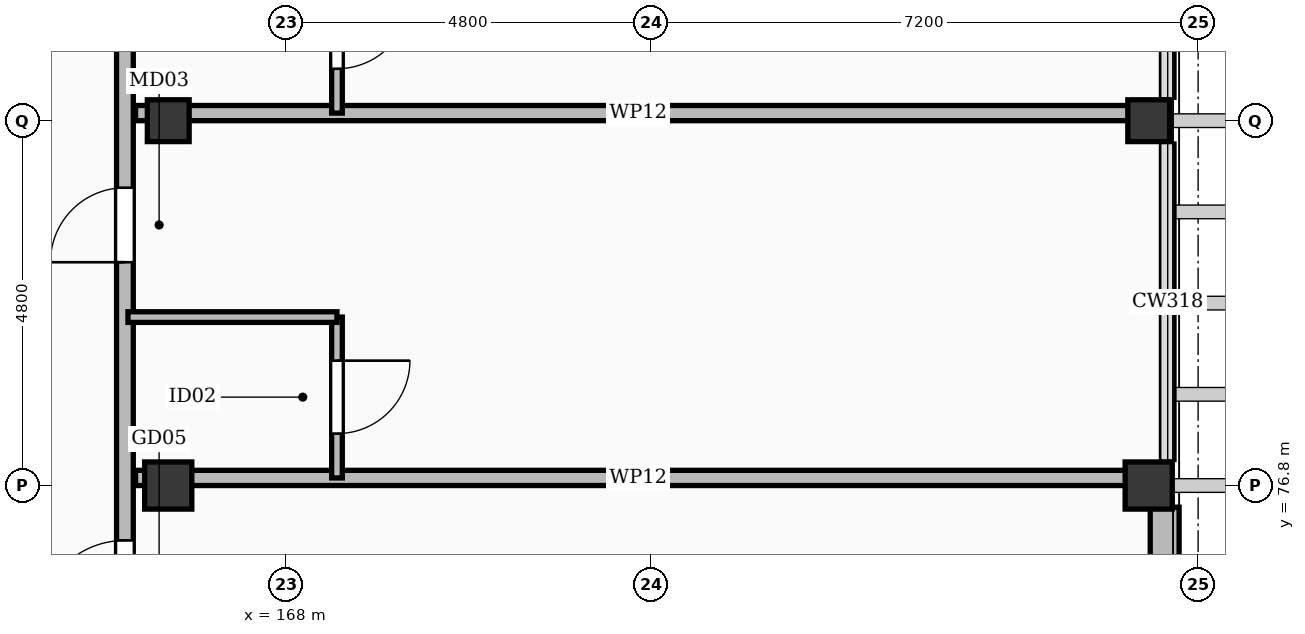
"""IFC4 building model, lengths in metres.
Left out: names, types, materials, properties, quantities, classifications, styles, units other than length and angle.
Written with IfcOpenShell. Run it as: python <this file> out.ifc"""

import sys

from ifc_helpers import new_model, si_unit, direction, frame, frame_2d, origin, origin_2d, place, context, subcontext, project, spatial, rectangle, extrude, element, fill, save


model = new_model("IFC4")
c1 = context("Model", 3, precision=1e-05, world=origin(), true_north=direction((0.0, 1.0)))
c2 = subcontext(c1, "Body", "Model", "MODEL_VIEW")
j1 = project(units=[si_unit("LENGTHUNIT", "METRE"), si_unit("PLANEANGLEUNIT", "RADIAN")], contexts=[c1])
p1 = place(None, origin())
s1 = spatial("IfcSite", under=j1, at=p1, CompositionType="ELEMENT")
p2 = place(p1, origin())
s2 = spatial("IfcBuilding", under=s1, at=p2, CompositionType="ELEMENT")
p3 = place(p2, frame((0.0, 0.0, 42.6)))
s3 = spatial("IfcBuildingStorey", under=s2, at=p3, CompositionType="ELEMENT", Elevation=42.6)
for number, where, z_axis, x_axis in (
    (1, (166.45, 76.8, 0.0), (0.0, 0.0, 1.0), (1.0, 0.0, 0.0)),
    (2, (179.35, 76.8, 0.0), (0.0, 0.0, 1.0), (1.0, 0.0, 0.0)),
):
    element("IfcColumn", number, at=place(p3, frame(where, z_axis=z_axis, x_axis=x_axis)), inside=s3, PredefinedType="COLUMN", context=c2, shape_type="SweptSolid", body=[
        extrude(rectangle(XDim=0.62, YDim=0.62, at=origin_2d()), origin(), (0.0, 0.0, 1.0), 3.9),
    ])
for number, where, z_axis, x_axis in (
    (3, (166.45, 81.6, 0.0), (0.0, 0.0, 1.0), (1.0, 0.0, 0.0)),
    (4, (179.35, 81.6, 0.0), (0.0, 0.0, 1.0), (1.0, 0.0, 0.0)),
):
    element("IfcColumn", number, at=place(p3, frame(where, z_axis=z_axis, x_axis=x_axis)), inside=s3, PredefinedType="COLUMN", context=c2, shape_type="SweptSolid", body=[
        extrude(rectangle(XDim=0.55, YDim=0.55, at=origin_2d()), origin(), (0.0, 0.0, 1.0), 3.9),
    ])
p4 = place(p3, frame((179.56, 76.515, 0.0), z_axis=(0.0, 0.0, 1.0), x_axis=(0.0, -1.0, 0.0)))
e5 = element("IfcWall", 5, at=p4, inside=s3, PredefinedType="SOLIDWALL", context=c2, shape_type="SweptSolid", body=[
    extrude(rectangle(XDim=4.265, YDim=0.38, at=frame_2d((2.132, 0.0))), origin(), (0.0, 0.0, 1.0), 2.902),
])
p5 = place(p4, frame((0.933, 0.0, 0.55)))
e6 = element("IfcOpeningElement", 6, at=p5, cuts=e5, PredefinedType="OPENING", context=c2, shape_type="SweptSolid", body=[
    extrude(rectangle(XDim=2.4, YDim=1.8, at=frame_2d((1.2, 0.9))), frame((0.0, 0.202, 0.0), z_axis=(0.0, -1.0, 0.0), x_axis=(1.0, 0.0, 0.0)), (0.0, 0.0, 1.0), 0.404),
])
p6 = place(p3, frame((165.88, 62.75, 0.0), z_axis=(0.0, 0.0, 1.0), x_axis=(0.0, 1.0, 0.0)))
e7 = element("IfcWall", 7, at=p6, inside=s3, PredefinedType="PARTITIONING", context=c2, shape_type="SweptSolid", body=[
    extrude(rectangle(XDim=62.9, YDim=0.22, at=frame_2d((31.45, 0.0))), origin(), (0.0, 0.0, 1.0), 2.902),
])
p7 = place(p6, frame((0.691, 0.0, 0.0)))
e8 = element("IfcOpeningElement", 8, at=p7, cuts=e7, PredefinedType="OPENING", context=c2, shape_type="SweptSolid", body=[
    extrude(rectangle(XDim=1.05, YDim=2.22, at=frame_2d((0.525, 1.11))), frame((0.0, 0.122, 0.0), z_axis=(0.0, -1.0, 0.0), x_axis=(1.0, 0.0, 0.0)), (0.0, 0.0, 1.0), 0.244),
])
p8 = place(p6, frame((7.388, 0.0, 0.0)))
e9 = element("IfcOpeningElement", 9, at=p8, cuts=e7, PredefinedType="OPENING", context=c2, shape_type="SweptSolid", body=[
    extrude(rectangle(XDim=1.02, YDim=2.2, at=frame_2d((0.51, 1.1))), frame((0.0, 0.122, 0.0), z_axis=(0.0, -1.0, 0.0), x_axis=(1.0, 0.0, 0.0)), (0.0, 0.0, 1.0), 0.244),
])
p9 = place(p6, frame((12.188, 0.0, 0.0)))
e10 = element("IfcOpeningElement", 10, at=p9, cuts=e7, PredefinedType="OPENING", context=c2, shape_type="SweptSolid", body=[
    extrude(rectangle(XDim=1.14, YDim=2.26, at=frame_2d((0.57, 1.13))), frame((0.0, 0.122, 0.0), z_axis=(0.0, -1.0, 0.0), x_axis=(1.0, 0.0, 0.0)), (0.0, 0.0, 1.0), 0.244),
])
p10 = place(p6, frame((16.988, 0.0, 0.0)))
e11 = element("IfcOpeningElement", 11, at=p10, cuts=e7, PredefinedType="OPENING", context=c2, shape_type="SweptSolid", body=[
    extrude(rectangle(XDim=0.98, YDim=2.15, at=frame_2d((0.49, 1.075))), frame((0.0, 0.122, 0.0), z_axis=(0.0, -1.0, 0.0), x_axis=(1.0, 0.0, 0.0)), (0.0, 0.0, 1.0), 0.244),
])
p11 = place(p6, frame((21.788, 0.0, 0.0)))
e12 = element("IfcOpeningElement", 12, at=p11, cuts=e7, PredefinedType="OPENING", context=c2, shape_type="SweptSolid", body=[
    extrude(rectangle(XDim=1.28, YDim=2.16, at=frame_2d((0.64, 1.08))), frame((0.0, 0.122, 0.0), z_axis=(0.0, -1.0, 0.0), x_axis=(1.0, 0.0, 0.0)), (0.0, 0.0, 1.0), 0.244),
])
p12 = place(p6, frame((26.588, 0.0, 0.0)))
e13 = element("IfcOpeningElement", 13, at=p12, cuts=e7, PredefinedType="OPENING", context=c2, shape_type="SweptSolid", body=[
    extrude(rectangle(XDim=0.9, YDim=2.08, at=frame_2d((0.45, 1.04))), frame((0.0, 0.122, 0.0), z_axis=(0.0, -1.0, 0.0), x_axis=(1.0, 0.0, 0.0)), (0.0, 0.0, 1.0), 0.244),
])
p13 = place(p6, frame((31.388, 0.0, 0.0)))
e14 = element("IfcOpeningElement", 14, at=p13, cuts=e7, PredefinedType="OPENING", context=c2, shape_type="SweptSolid", body=[
    extrude(rectangle(XDim=1.05, YDim=2.22, at=frame_2d((0.525, 1.11))), frame((0.0, 0.122, 0.0), z_axis=(0.0, -1.0, 0.0), x_axis=(1.0, 0.0, 0.0)), (0.0, 0.0, 1.0), 0.244),
])
p14 = place(p6, frame((36.188, 0.0, 0.0)))
e15 = element("IfcOpeningElement", 15, at=p14, cuts=e7, PredefinedType="OPENING", context=c2, shape_type="SweptSolid", body=[
    extrude(rectangle(XDim=1.02, YDim=2.2, at=frame_2d((0.51, 1.1))), frame((0.0, 0.122, 0.0), z_axis=(0.0, -1.0, 0.0), x_axis=(1.0, 0.0, 0.0)), (0.0, 0.0, 1.0), 0.244),
])
p15 = place(p6, frame((40.988, 0.0, 0.0)))
e16 = element("IfcOpeningElement", 16, at=p15, cuts=e7, PredefinedType="OPENING", context=c2, shape_type="SweptSolid", body=[
    extrude(rectangle(XDim=1.14, YDim=2.26, at=frame_2d((0.57, 1.13))), frame((0.0, 0.122, 0.0), z_axis=(0.0, -1.0, 0.0), x_axis=(1.0, 0.0, 0.0)), (0.0, 0.0, 1.0), 0.244),
])
p16 = place(p6, frame((45.788, 0.0, 0.0)))
e17 = element("IfcOpeningElement", 17, at=p16, cuts=e7, PredefinedType="OPENING", context=c2, shape_type="SweptSolid", body=[
    extrude(rectangle(XDim=0.98, YDim=2.15, at=frame_2d((0.49, 1.075))), frame((0.0, 0.122, 0.0), z_axis=(0.0, -1.0, 0.0), x_axis=(1.0, 0.0, 0.0)), (0.0, 0.0, 1.0), 0.244),
])
p17 = place(p6, frame((50.588, 0.0, 0.0)))
e18 = element("IfcOpeningElement", 18, at=p17, cuts=e7, PredefinedType="OPENING", context=c2, shape_type="SweptSolid", body=[
    extrude(rectangle(XDim=1.28, YDim=2.16, at=frame_2d((0.64, 1.08))), frame((0.0, 0.122, 0.0), z_axis=(0.0, -1.0, 0.0), x_axis=(1.0, 0.0, 0.0)), (0.0, 0.0, 1.0), 0.244),
])
p18 = place(p6, frame((55.388, 0.0, 0.0)))
e19 = element("IfcOpeningElement", 19, at=p18, cuts=e7, PredefinedType="OPENING", context=c2, shape_type="SweptSolid", body=[
    extrude(rectangle(XDim=0.9, YDim=2.08, at=frame_2d((0.45, 1.04))), frame((0.0, 0.122, 0.0), z_axis=(0.0, -1.0, 0.0), x_axis=(1.0, 0.0, 0.0)), (0.0, 0.0, 1.0), 0.244),
])
p19 = place(p6, frame((60.188, 0.0, 0.0)))
e20 = element("IfcOpeningElement", 20, at=p19, cuts=e7, PredefinedType="OPENING", context=c2, shape_type="SweptSolid", body=[
    extrude(rectangle(XDim=1.05, YDim=2.22, at=frame_2d((0.525, 1.11))), frame((0.0, 0.122, 0.0), z_axis=(0.0, -1.0, 0.0), x_axis=(1.0, 0.0, 0.0)), (0.0, 0.0, 1.0), 0.244),
])
p20 = place(p3, frame((166.02, 76.9, 0.0), z_axis=(0.0, 0.0, 1.0), x_axis=(1.0, 0.0, 0.0)))
e21 = element("IfcWall", 21, at=p20, inside=s3, PredefinedType="PARTITIONING", context=c2, shape_type="SweptSolid", body=[
    extrude(rectangle(XDim=13.23, YDim=0.2, at=frame_2d((6.615, 0.0))), origin(), (0.0, 0.0, 1.0), 2.902),
])
p21 = place(p3, frame((168.67, 76.9, 0.0), z_axis=(0.0, 0.0, 1.0), x_axis=(0.0, 1.0, 0.0)))
e22 = element("IfcWall", 22, at=p21, inside=s3, PredefinedType="PARTITIONING", context=c2, shape_type="SweptSolid", body=[
    extrude(rectangle(XDim=2.116, YDim=0.14, at=frame_2d((1.058, 0.0))), origin(), (0.0, 0.0, 1.0), 3.072),
])
p22 = place(p21, frame((0.583, 0.0, 0.0)))
e23 = element("IfcOpeningElement", 23, at=p22, cuts=e22, PredefinedType="OPENING", context=c2, shape_type="SweptSolid", body=[
    extrude(rectangle(XDim=0.96, YDim=2.12, at=frame_2d((0.48, 1.06))), frame((0.0, 0.082, 0.0), z_axis=(0.0, -1.0, 0.0), x_axis=(1.0, 0.0, 0.0)), (0.0, 0.0, 1.0), 0.164),
])
p23 = place(p3, frame((165.92, 79.016, 0.0), z_axis=(0.0, 0.0, 1.0), x_axis=(1.0, 0.0, 0.0)))
e24 = element("IfcWall", 24, at=p23, inside=s3, PredefinedType="PARTITIONING", context=c2, shape_type="SweptSolid", body=[
    extrude(rectangle(XDim=2.75, YDim=0.14, at=frame_2d((1.375, 0.0))), origin(), (0.0, 0.0, 1.0), 3.072),
])
p24 = place(p3, frame((166.02, 81.7, 0.0), z_axis=(0.0, 0.0, 1.0), x_axis=(1.0, 0.0, 0.0)))
e25 = element("IfcWall", 25, at=p24, inside=s3, PredefinedType="PARTITIONING", context=c2, shape_type="SweptSolid", body=[
    extrude(rectangle(XDim=13.23, YDim=0.2, at=frame_2d((6.615, 0.0))), origin(), (0.0, 0.0, 1.0), 2.902),
])
p25 = place(p3, frame((168.67, 81.7, 0.0), z_axis=(0.0, 0.0, 1.0), x_axis=(0.0, 1.0, 0.0)))
e26 = element("IfcWall", 26, at=p25, inside=s3, PredefinedType="PARTITIONING", context=c2, shape_type="SweptSolid", body=[
    extrude(rectangle(XDim=2.116, YDim=0.14, at=frame_2d((1.058, 0.0))), origin(), (0.0, 0.0, 1.0), 3.072),
])
p26 = place(p25, frame((0.583, 0.0, 0.0)))
e27 = element("IfcOpeningElement", 27, at=p26, cuts=e26, PredefinedType="OPENING", context=c2, shape_type="SweptSolid", body=[
    extrude(rectangle(XDim=0.96, YDim=2.12, at=frame_2d((0.48, 1.06))), frame((0.0, 0.082, 0.0), z_axis=(0.0, -1.0, 0.0), x_axis=(1.0, 0.0, 0.0)), (0.0, 0.0, 1.0), 0.164),
])
p27 = place(p9, origin())
e28 = element("IfcDoor", 28, at=p27, inside=s3, OperationType="SINGLE_SWING_LEFT", PredefinedType="DOOR", context=c2, shape_type="SweptSolid", body=[
    extrude(rectangle(XDim=1.14, YDim=2.26, at=frame_2d((0.57, 1.13))), frame((0.0, 0.025, 0.0), z_axis=(0.0, -1.0, 0.0), x_axis=(1.0, 0.0, 0.0)), (0.0, 0.0, 1.0), 0.05),
])
fill(e10, e28)
p28 = place(p10, origin())
e29 = element("IfcDoor", 29, at=p28, inside=s3, OperationType="SINGLE_SWING_LEFT", PredefinedType="DOOR", context=c2, shape_type="SweptSolid", body=[
    extrude(rectangle(XDim=0.98, YDim=2.15, at=frame_2d((0.49, 1.075))), frame((0.0, 0.025, 0.0), z_axis=(0.0, -1.0, 0.0), x_axis=(1.0, 0.0, 0.0)), (0.0, 0.0, 1.0), 0.05),
])
fill(e11, e29)
p29 = place(p22, frame((0.96, 0.0, 0.0), z_axis=(0.0, 0.0, 1.0), x_axis=(-1.0, 0.0, 0.0)))
e30 = element("IfcDoor", 30, at=p29, inside=s3, OperationType="SINGLE_SWING_RIGHT", PredefinedType="DOOR", context=c2, shape_type="SweptSolid", body=[
    extrude(rectangle(XDim=0.96, YDim=2.12, at=frame_2d((0.48, 1.06))), frame((0.0, 0.025, 0.0), z_axis=(0.0, -1.0, 0.0), x_axis=(1.0, 0.0, 0.0)), (0.0, 0.0, 1.0), 0.05),
])
fill(e23, e30)
p30 = place(p26, frame((0.96, 0.0, 0.0), z_axis=(0.0, 0.0, 1.0), x_axis=(-1.0, 0.0, 0.0)))
e31 = element("IfcDoor", 31, at=p30, inside=s3, OperationType="SINGLE_SWING_RIGHT", PredefinedType="DOOR", context=c2, shape_type="SweptSolid", body=[
    extrude(rectangle(XDim=0.96, YDim=2.12, at=frame_2d((0.48, 1.06))), frame((0.0, 0.025, 0.0), z_axis=(0.0, -1.0, 0.0), x_axis=(1.0, 0.0, 0.0)), (0.0, 0.0, 1.0), 0.05),
])
fill(e27, e31)
save(model, sys.argv[1])
